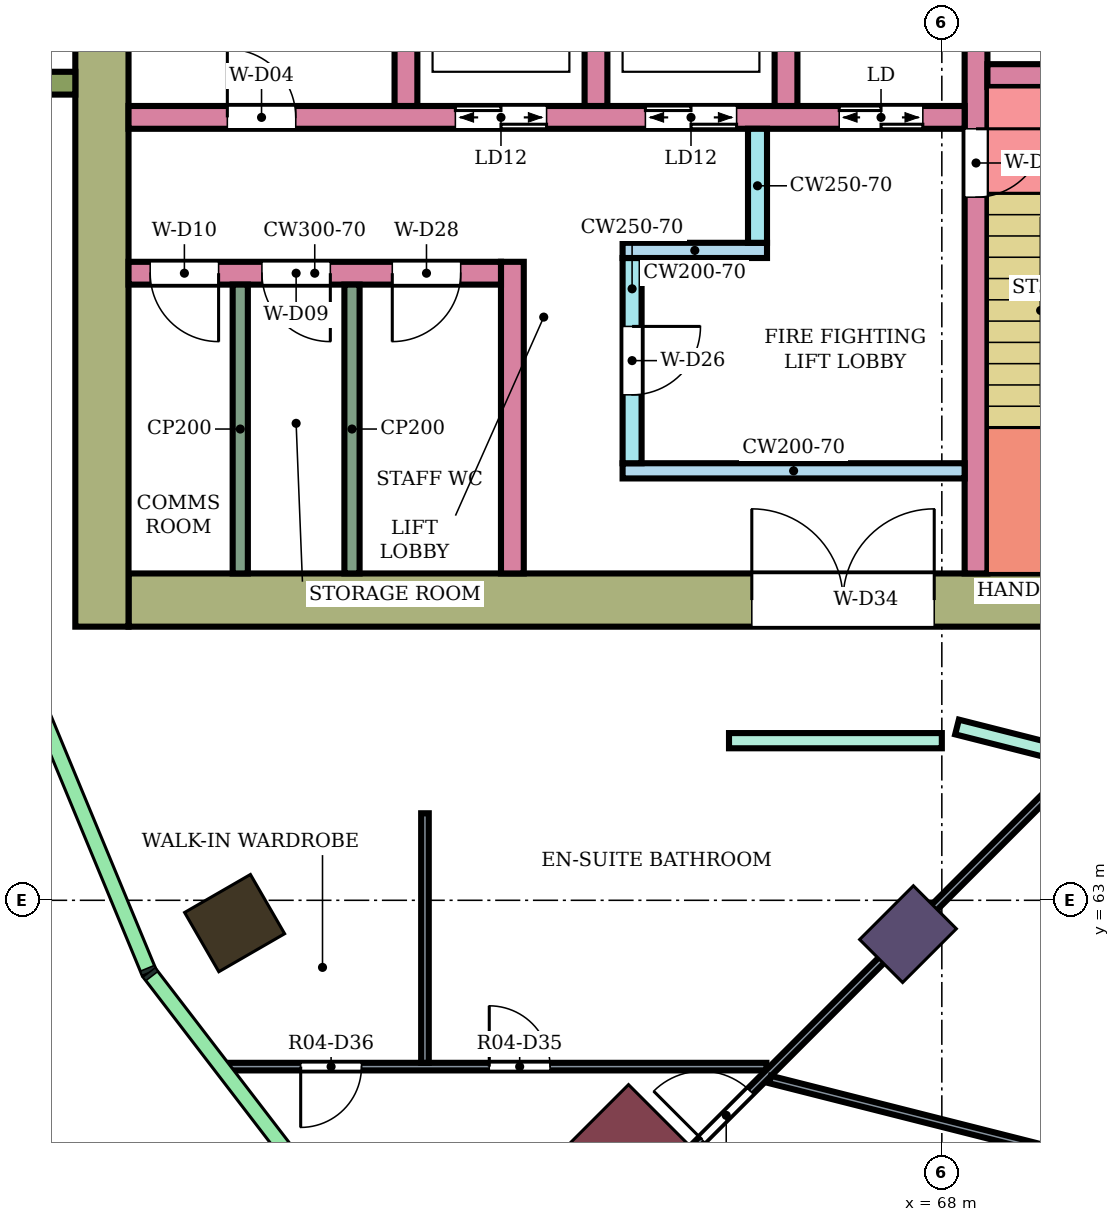
"""IFC4 building model, lengths in metres.
Left out: names, types, materials, properties, quantities, classifications, styles, units other than length and angle.
Written with IfcOpenShell. Run it as: python <this file> out.ifc"""

import sys

from ifc_helpers import new_model, si_unit, direction, frame, frame_2d, origin, origin_2d, place, context, subcontext, project, spatial, rectangle, extrude, element, fill, save


model = new_model("IFC4")
c1 = context("Model", 3, precision=1e-05, world=origin(), true_north=direction((0.0, 1.0)))
c2 = subcontext(c1, "Body", "Model", "MODEL_VIEW")
j1 = project(units=[si_unit("LENGTHUNIT", "METRE"), si_unit("PLANEANGLEUNIT", "RADIAN")], contexts=[c1])
p1 = place(None, origin())
s1 = spatial("IfcSite", under=j1, at=p1, CompositionType="ELEMENT")
p2 = place(p1, origin())
s2 = spatial("IfcBuilding", under=s1, at=p2, CompositionType="ELEMENT")
p3 = place(p2, frame((0.0, 0.0, 198.7)))
s3 = spatial("IfcBuildingStorey", under=s2, at=p3, CompositionType="ELEMENT", Elevation=198.7)
p4 = place(p3, frame((58.696, 62.7, 0.0), z_axis=(0.0, 0.0, 1.0), x_axis=(-0.866025403784, -0.5, 0.0)))
e1 = element("IfcColumn", 1, at=p4, inside=s3, PredefinedType="COLUMN", context=c2, shape_type="SweptSolid", body=[
    extrude(rectangle(XDim=1.0, YDim=0.9, at=origin_2d()), origin(), (0.0, 0.0, 1.0), 4.1),
])
p5 = place(p3, frame((67.555, 62.555, 0.0), z_axis=(0.0, 0.0, 1.0), x_axis=(-0.707106781187, -0.707106781187, 0.0)))
e2 = element("IfcColumn", 2, at=p5, inside=s3, PredefinedType="COLUMN", context=c2, shape_type="SweptSolid", body=[
    extrude(rectangle(XDim=1.0, YDim=0.8, at=origin_2d()), origin(), (0.0, 0.0, 1.0), 4.1),
])
p6 = place(p3, frame((64.09, 59.09, 0.0), z_axis=(0.0, 0.0, 1.0), x_axis=(-0.707106781187, -0.707106781187, 0.0)))
e3 = element("IfcColumn", 3, at=p6, inside=s3, PredefinedType="COLUMN", context=c2, shape_type="SweptSolid", body=[
    extrude(rectangle(XDim=1.8, YDim=2.4, at=origin_2d()), origin(), (0.0, 0.0, 1.0), 4.1),
])
p7 = place(p3, frame((72.1, 66.95, 0.0), z_axis=(0.0, 0.0, 1.0), x_axis=(-1.0, 0.0, 0.0)))
e4 = element("IfcWall", 4, at=p7, inside=s3, PredefinedType="SHEAR", context=c2, shape_type="SweptSolid", body=[
    extrude(rectangle(XDim=14.8, YDim=0.7, at=frame_2d((7.4, 0.0))), origin(), (0.0, 0.0, 1.0), 3.78),
])
p8 = place(p7, frame((4.2, 0.0, 0.0)))
e5 = element("IfcOpeningElement", 5, at=p8, cuts=e4, PredefinedType="OPENING", context=c2, shape_type="SweptSolid", body=[
    extrude(rectangle(XDim=2.4, YDim=2.4, at=frame_2d((1.2, 1.2))), frame((0.0, 0.36, 0.0), z_axis=(0.0, -1.0, 0.0), x_axis=(1.0, 0.0, 0.0)), (0.0, 0.0, 1.0), 0.72),
])
p9 = place(p3, frame((56.95, 83.4, 0.0), z_axis=(0.0, 0.0, 1.0), x_axis=(0.0, -1.0, 0.0)))
e6 = element("IfcWall", 6, at=p9, inside=s3, PredefinedType="SHEAR", context=c2, shape_type="SweptSolid", body=[
    extrude(rectangle(XDim=16.8, YDim=0.7, at=frame_2d((8.4, 0.0))), origin(), (0.0, 0.0, 1.0), 3.78),
])
p10 = place(p3, frame((68.45, 75.0, 0.0), z_axis=(0.0, 0.0, 1.0), x_axis=(0.0, -1.0, 0.0)))
e7 = element("IfcWall", 7, at=p10, inside=s3, PredefinedType="SHEAR", context=c2, shape_type="SweptSolid", body=[
    extrude(rectangle(XDim=7.7, YDim=0.3, at=frame_2d((3.85, 0.0))), origin(), (0.0, 0.0, 1.0), 3.78),
])
p11 = place(p10, frame((1.85, 0.0, 0.0)))
e8 = element("IfcOpeningElement", 8, at=p11, cuts=e7, PredefinedType="OPENING", context=c2, shape_type="SweptSolid", body=[
    extrude(rectangle(XDim=0.9, YDim=2.1, at=frame_2d((0.45, 1.05))), frame((0.0, 0.16, 0.0), z_axis=(0.0, -1.0, 0.0), x_axis=(1.0, 0.0, 0.0)), (0.0, 0.0, 1.0), 0.32),
])
p12 = place(p3, frame((71.65, 73.85, 0.0), z_axis=(0.0, 0.0, 1.0), x_axis=(-1.0, 0.0, 0.0)))
e9 = element("IfcWall", 9, at=p12, inside=s3, PredefinedType="SHEAR", context=c2, shape_type="SweptSolid", body=[
    extrude(rectangle(XDim=3.05, YDim=0.3, at=frame_2d((1.525, 0.0))), origin(), (0.0, 0.0, 1.0), 3.78),
])
p13 = place(p12, frame((1.1, 0.0, 0.0)))
e10 = element("IfcOpeningElement", 10, at=p13, cuts=e9, PredefinedType="OPENING", context=c2, shape_type="SweptSolid", body=[
    extrude(rectangle(XDim=0.7, YDim=2.0, at=frame_2d((0.35, 1.0))), frame((0.0, 0.16, 0.0), z_axis=(0.0, -1.0, 0.0), x_axis=(1.0, 0.0, 0.0)), (0.0, 0.0, 1.0), 0.32),
])
p14 = place(p3, frame((68.3, 73.3, 0.0), z_axis=(0.0, 0.0, 1.0), x_axis=(-1.0, 0.0, 0.0)))
e11 = element("IfcWall", 11, at=p14, inside=s3, PredefinedType="SHEAR", context=c2, shape_type="SweptSolid", body=[
    extrude(rectangle(XDim=11.0, YDim=0.3, at=frame_2d((5.5, 0.0))), origin(), (0.0, 0.0, 1.0), 3.78),
])
p15 = place(p14, frame((0.55, 0.0, 0.0)))
e12 = element("IfcOpeningElement", 12, at=p15, cuts=e11, PredefinedType="OPENING", context=c2, shape_type="SweptSolid", body=[
    extrude(rectangle(XDim=1.1, YDim=2.1, at=frame_2d((0.55, 1.05))), frame((0.0, 0.16, 0.0), z_axis=(0.0, -1.0, 0.0), x_axis=(1.0, 0.0, 0.0)), (0.0, 0.0, 1.0), 0.32),
])
p16 = place(p14, frame((3.0, 0.0, 0.0)))
e13 = element("IfcOpeningElement", 13, at=p16, cuts=e11, PredefinedType="OPENING", context=c2, shape_type="SweptSolid", body=[
    extrude(rectangle(XDim=1.2, YDim=2.1, at=frame_2d((0.6, 1.05))), frame((0.0, 0.16, 0.0), z_axis=(0.0, -1.0, 0.0), x_axis=(1.0, 0.0, 0.0)), (0.0, 0.0, 1.0), 0.32),
])
p17 = place(p14, frame((5.5, 0.0, 0.0)))
e14 = element("IfcOpeningElement", 14, at=p17, cuts=e11, PredefinedType="OPENING", context=c2, shape_type="SweptSolid", body=[
    extrude(rectangle(XDim=1.2, YDim=2.1, at=frame_2d((0.6, 1.05))), frame((0.0, 0.16, 0.0), z_axis=(0.0, -1.0, 0.0), x_axis=(1.0, 0.0, 0.0)), (0.0, 0.0, 1.0), 0.32),
])
p18 = place(p14, frame((8.8, 0.0, 0.0)))
e15 = element("IfcOpeningElement", 15, at=p18, cuts=e11, PredefinedType="OPENING", context=c2, shape_type="SweptSolid", body=[
    extrude(rectangle(XDim=0.9, YDim=2.1, at=frame_2d((0.45, 1.05))), frame((0.0, 0.16, 0.0), z_axis=(0.0, -1.0, 0.0), x_axis=(1.0, 0.0, 0.0)), (0.0, 0.0, 1.0), 0.32),
])
for number, where, z_axis, x_axis in (
    (16, (65.95, 76.0, 0.0), (0.0, 0.0, 1.0), (0.0, -1.0, 0.0)),
    (17, (63.45, 76.0, 0.0), (0.0, 0.0, 1.0), (0.0, -1.0, 0.0)),
    (18, (60.95, 76.0, 0.0), (0.0, 0.0, 1.0), (0.0, -1.0, 0.0)),
):
    element("IfcWall", number, at=place(p3, frame(where, z_axis=z_axis, x_axis=x_axis)), inside=s3, PredefinedType="SHEAR", context=c2, shape_type="SweptSolid", body=[
        extrude(rectangle(XDim=2.55, YDim=0.3, at=frame_2d((1.275, 0.0))), origin(), (0.0, 0.0, 1.0), 3.78),
    ])
p19 = place(p3, frame((68.3, 68.65, 0.0), z_axis=(0.0, 0.0, 1.0), x_axis=(-1.0, 0.0, 0.0)))
e19 = element("IfcWall", 19, at=p19, inside=s3, PredefinedType="SHEAR", context=c2, shape_type="SweptSolid", body=[
    extrude(rectangle(XDim=4.5, YDim=0.2, at=frame_2d((2.25, 0.0))), origin(), (0.0, 0.0, 1.0), 3.78),
])
p20 = place(p3, frame((63.925, 71.45, 0.0), z_axis=(0.0, 0.0, 1.0), x_axis=(0.0, -1.0, 0.0)))
e20 = element("IfcWall", 20, at=p20, inside=s3, PredefinedType="SHEAR", context=c2, shape_type="SweptSolid", body=[
    extrude(rectangle(XDim=2.7, YDim=0.25, at=frame_2d((1.35, 0.0))), origin(), (0.0, 0.0, 1.0), 3.78),
])
p21 = place(p20, frame((0.9, 0.0, 0.0)))
e21 = element("IfcOpeningElement", 21, at=p21, cuts=e20, PredefinedType="OPENING", context=c2, shape_type="SweptSolid", body=[
    extrude(rectangle(XDim=0.9, YDim=2.1, at=frame_2d((0.45, 1.05))), frame((0.0, 0.135, 0.0), z_axis=(0.0, -1.0, 0.0), x_axis=(1.0, 0.0, 0.0)), (0.0, 0.0, 1.0), 0.27),
])
p22 = place(p3, frame((65.7, 71.55, 0.0), z_axis=(0.0, 0.0, 1.0), x_axis=(-1.0, 0.0, 0.0)))
e22 = element("IfcWall", 22, at=p22, inside=s3, PredefinedType="SHEAR", context=c2, shape_type="SweptSolid", body=[
    extrude(rectangle(XDim=1.9, YDim=0.2, at=frame_2d((0.95, 0.0))), origin(), (0.0, 0.0, 1.0), 3.78),
])
p23 = place(p3, frame((65.575, 73.15, 0.0), z_axis=(0.0, 0.0, 1.0), x_axis=(0.0, -1.0, 0.0)))
e23 = element("IfcWall", 23, at=p23, inside=s3, PredefinedType="SHEAR", context=c2, shape_type="SweptSolid", body=[
    extrude(rectangle(XDim=1.5, YDim=0.25, at=frame_2d((0.75, 0.0))), origin(), (0.0, 0.0, 1.0), 3.78),
])
p24 = place(p3, frame((62.35, 71.4, 0.0), z_axis=(0.0, 0.0, 1.0), x_axis=(0.0, -1.0, 0.0)))
e24 = element("IfcWall", 24, at=p24, inside=s3, PredefinedType="SHEAR", context=c2, shape_type="SweptSolid", body=[
    extrude(rectangle(XDim=4.1, YDim=0.3, at=frame_2d((2.05, 0.0))), origin(), (0.0, 0.0, 1.0), 3.78),
])
p25 = place(p3, frame((62.2, 71.25, 0.0), z_axis=(0.0, 0.0, 1.0), x_axis=(-1.0, 0.0, 0.0)))
e25 = element("IfcWall", 25, at=p25, inside=s3, PredefinedType="SHEAR", context=c2, shape_type="SweptSolid", body=[
    extrude(rectangle(XDim=4.9, YDim=0.3, at=frame_2d((2.45, 0.0))), origin(), (0.0, 0.0, 1.0), 3.78),
])
p26 = place(p25, frame((0.53, 0.0, 0.0)))
e26 = element("IfcOpeningElement", 26, at=p26, cuts=e25, PredefinedType="OPENING", context=c2, shape_type="SweptSolid", body=[
    extrude(rectangle(XDim=0.9, YDim=2.1, at=frame_2d((0.45, 1.05))), frame((0.0, 0.16, 0.0), z_axis=(0.0, -1.0, 0.0), x_axis=(1.0, 0.0, 0.0)), (0.0, 0.0, 1.0), 0.32),
])
p27 = place(p25, frame((2.245, 0.0, 0.0)))
e27 = element("IfcOpeningElement", 27, at=p27, cuts=e25, PredefinedType="OPENING", context=c2, shape_type="SweptSolid", body=[
    extrude(rectangle(XDim=0.9, YDim=2.1, at=frame_2d((0.45, 1.05))), frame((0.0, 0.16, 0.0), z_axis=(0.0, -1.0, 0.0), x_axis=(1.0, 0.0, 0.0)), (0.0, 0.0, 1.0), 0.32),
])
p28 = place(p25, frame((3.715, 0.0, 0.0)))
e28 = element("IfcOpeningElement", 28, at=p28, cuts=e25, PredefinedType="OPENING", context=c2, shape_type="SweptSolid", body=[
    extrude(rectangle(XDim=0.9, YDim=2.1, at=frame_2d((0.45, 1.05))), frame((0.0, 0.16, 0.0), z_axis=(0.0, -1.0, 0.0), x_axis=(1.0, 0.0, 0.0)), (0.0, 0.0, 1.0), 0.32),
])
p29 = place(p3, frame((56.6, 73.75, 0.0), z_axis=(0.0, 0.0, 1.0), x_axis=(-1.0, 0.0, 0.0)))
e29 = element("IfcWall", 29, at=p29, inside=s3, PredefinedType="NOTDEFINED", context=c2, shape_type="SweptSolid", body=[
    extrude(rectangle(XDim=2.416, YDim=0.3, at=frame_2d((1.208, 0.0))), origin(), (0.0, 0.0, 1.0), 4.1),
])
p30 = place(p3, frame((65.2, 65.1, 0.0), z_axis=(0.0, 0.0, 1.0), x_axis=(1.0, 0.0, 0.0)))
e30 = element("IfcWall", 30, at=p30, inside=s3, PredefinedType="PARTITIONING", context=c2, shape_type="SweptSolid", body=[
    extrude(rectangle(XDim=2.8, YDim=0.2, at=frame_2d((1.4, 0.0))), origin(), (0.0, 0.0, 1.0), 3.65),
])
p31 = place(p3, frame((68.2, 65.28, 0.0), z_axis=(0.0, 0.0, 1.0), x_axis=(0.969450596516, -0.245286650503, 0.0)))
e31 = element("IfcWall", 31, at=p31, inside=s3, PredefinedType="PARTITIONING", context=c2, shape_type="SweptSolid", body=[
    extrude(rectangle(XDim=5.928, YDim=0.2, at=frame_2d((2.964, 0.0))), origin(), (0.0, 0.0, 1.0), 3.65),
])
p32 = place(p3, frame((58.6, 60.812, 0.0), z_axis=(0.0, 0.0, 1.0), x_axis=(1.0, 0.0, 0.0)))
e32 = element("IfcWall", 32, at=p32, inside=s3, PredefinedType="PARTITIONING", context=c2, shape_type="SweptSolid", body=[
    extrude(rectangle(XDim=7.092, YDim=0.1, at=frame_2d((3.546, 0.0))), origin(), (0.0, 0.0, 1.0), 3.65),
])
p33 = place(p32, frame((3.446, 0.0, 0.0)))
e33 = element("IfcOpeningElement", 33, at=p33, cuts=e32, PredefinedType="OPENING", context=c2, shape_type="SweptSolid", body=[
    extrude(rectangle(XDim=0.8, YDim=2.1, at=frame_2d((0.4, 1.05))), frame((0.0, 0.06, 0.0), z_axis=(0.0, -1.0, 0.0), x_axis=(1.0, 0.0, 0.0)), (0.0, 0.0, 1.0), 0.12),
])
p34 = place(p32, frame((0.965, 0.0, 0.0)))
e34 = element("IfcOpeningElement", 34, at=p34, cuts=e32, PredefinedType="OPENING", context=c2, shape_type="SweptSolid", body=[
    extrude(rectangle(XDim=0.8, YDim=2.1, at=frame_2d((0.4, 1.05))), frame((0.0, 0.06, 0.0), z_axis=(0.0, -1.0, 0.0), x_axis=(1.0, 0.0, 0.0)), (0.0, 0.0, 1.0), 0.12),
])
p35 = place(p3, frame((61.2, 60.862, 0.0), z_axis=(0.0, 0.0, 1.0), x_axis=(0.0, 1.0, 0.0)))
e35 = element("IfcWall", 35, at=p35, inside=s3, PredefinedType="PARTITIONING", context=c2, shape_type="SweptSolid", body=[
    extrude(rectangle(XDim=3.283, YDim=0.1, at=frame_2d((1.642, 0.0))), origin(), (0.0, 0.0, 1.0), 3.65),
])
p36 = place(p3, frame((63.592, 58.6, 0.0), z_axis=(0.0, 0.0, 1.0), x_axis=(0.707260766325, 0.706952762508, 0.0)))
e36 = element("IfcWall", 36, at=p36, inside=s3, PredefinedType="PARTITIONING", context=c2, shape_type="SweptSolid", body=[
    extrude(rectangle(XDim=8.719, YDim=0.1, at=frame_2d((4.36, 0.0))), origin(), (0.0, 0.0, 1.0), 3.65),
])
p37 = place(p36, frame((1.772, 0.0, 0.0)))
e37 = element("IfcOpeningElement", 37, at=p37, cuts=e36, PredefinedType="OPENING", context=c2, shape_type="SweptSolid", body=[
    extrude(rectangle(XDim=0.9, YDim=2.1, at=frame_2d((0.45, 1.05))), frame((0.0, 0.06, 0.0), z_axis=(0.0, -1.0, 0.0), x_axis=(1.0, 0.0, 0.0)), (0.0, 0.0, 1.0), 0.12),
])
p38 = place(p3, frame((65.74, 60.642, 0.0), z_axis=(0.0, 0.0, 1.0), x_axis=(0.969435742918, -0.245345349156, 0.0)))
e38 = element("IfcWall", 38, at=p38, inside=s3, PredefinedType="PARTITIONING", context=c2, shape_type="SweptSolid", body=[
    extrude(rectangle(XDim=5.314, YDim=0.1, at=frame_2d((2.657, 0.0))), origin(), (0.0, 0.0, 1.0), 3.65),
])
p39 = place(p3, frame((67.101, 52.659, 0.0), z_axis=(0.0, 0.0, 1.0), x_axis=(0.500035926033, 0.866004660886, 0.0)))
e39 = element("IfcWall", 39, at=p39, inside=s3, PredefinedType="PARTITIONING", context=c2, shape_type="SweptSolid", body=[
    extrude(rectangle(XDim=12.876, YDim=0.1, at=frame_2d((6.438, 0.0))), origin(), (0.0, 0.0, 1.0), 3.65),
])
p40 = place(p39, frame((2.401, 0.0, 0.0)))
e40 = element("IfcOpeningElement", 40, at=p40, cuts=e39, PredefinedType="OPENING", context=c2, shape_type="SweptSolid", body=[
    extrude(rectangle(XDim=0.9, YDim=2.1, at=frame_2d((0.45, 1.05))), frame((0.0, 0.06, 0.0), z_axis=(0.0, -1.0, 0.0), x_axis=(1.0, 0.0, 0.0)), (0.0, 0.0, 1.0), 0.12),
])
p41 = place(p39, frame((9.936, 0.0, 0.0)))
e41 = element("IfcOpeningElement", 41, at=p41, cuts=e39, PredefinedType="OPENING", context=c2, shape_type="SweptSolid", body=[
    extrude(rectangle(XDim=0.8, YDim=2.1, at=frame_2d((0.4, 1.05))), frame((0.0, 0.06, 0.0), z_axis=(0.0, -1.0, 0.0), x_axis=(1.0, 0.0, 0.0)), (0.0, 0.0, 1.0), 0.12),
])
for number, where, z_axis, x_axis in (
    (42, (60.24, 71.1, 0.0), (0.0, 0.0, 1.0), (0.0, -1.0, 0.0)),
    (43, (58.77, 71.1, 0.0), (0.0, 0.0, 1.0), (0.0, -1.0, 0.0)),
):
    element("IfcWall", number, at=place(p3, frame(where, z_axis=z_axis, x_axis=x_axis)), inside=s3, PredefinedType="PARTITIONING", context=c2, shape_type="SweptSolid", body=[
        extrude(rectangle(XDim=3.8, YDim=0.2, at=frame_2d((1.9, 0.0))), origin(), (0.0, 0.0, 1.0), 3.78),
    ])
p42 = place(p37, origin())
e44 = element("IfcDoor", 44, at=p42, inside=s3, OperationType="SINGLE_SWING_LEFT", PredefinedType="DOOR", context=c2, shape_type="SweptSolid", body=[
    extrude(rectangle(XDim=0.9, YDim=2.1, at=frame_2d((0.45, 1.05))), frame((0.0, 0.025, 0.0), z_axis=(0.0, -1.0, 0.0), x_axis=(1.0, 0.0, 0.0)), (0.0, 0.0, 1.0), 0.05),
])
fill(e37, e44)
p43 = place(p33, origin())
e45 = element("IfcDoor", 45, at=p43, inside=s3, OperationType="SINGLE_SWING_LEFT", PredefinedType="DOOR", context=c2, shape_type="SweptSolid", body=[
    extrude(rectangle(XDim=0.8, YDim=2.1, at=frame_2d((0.4, 1.05))), frame((0.0, 0.025, 0.0), z_axis=(0.0, -1.0, 0.0), x_axis=(1.0, 0.0, 0.0)), (0.0, 0.0, 1.0), 0.05),
])
fill(e33, e45)
p44 = place(p34, frame((0.8, 0.0, 0.0), z_axis=(0.0, 0.0, 1.0), x_axis=(-1.0, 0.0, 0.0)))
e46 = element("IfcDoor", 46, at=p44, inside=s3, OperationType="SINGLE_SWING_RIGHT", PredefinedType="DOOR", context=c2, shape_type="SweptSolid", body=[
    extrude(rectangle(XDim=0.8, YDim=2.1, at=frame_2d((0.4, 1.05))), frame((0.0, 0.025, 0.0), z_axis=(0.0, -1.0, 0.0), x_axis=(1.0, 0.0, 0.0)), (0.0, 0.0, 1.0), 0.05),
])
fill(e34, e46)
p45 = place(p11, origin())
e47 = element("IfcDoor", 47, at=p45, inside=s3, OperationType="SINGLE_SWING_LEFT", PredefinedType="DOOR", context=c2, shape_type="SweptSolid", body=[
    extrude(rectangle(XDim=0.9, YDim=2.1, at=frame_2d((0.45, 1.05))), frame((0.0, 0.025, 0.0), z_axis=(0.0, -1.0, 0.0), x_axis=(1.0, 0.0, 0.0)), (0.0, 0.0, 1.0), 0.05),
])
fill(e8, e47)
p46 = place(p15, origin())
e48 = element("IfcDoor", 48, at=p46, inside=s3, OperationType="DOUBLE_DOOR_SLIDING", PredefinedType="DOOR", context=c2, shape_type="SweptSolid", body=[
    extrude(rectangle(XDim=1.1, YDim=2.1, at=frame_2d((0.55, 1.05))), frame((0.0, 0.025, 0.0), z_axis=(0.0, -1.0, 0.0), x_axis=(1.0, 0.0, 0.0)), (0.0, 0.0, 1.0), 0.05),
])
fill(e12, e48)
p47 = place(p16, origin())
e49 = element("IfcDoor", 49, at=p47, inside=s3, OperationType="DOUBLE_DOOR_SLIDING", PredefinedType="DOOR", context=c2, shape_type="SweptSolid", body=[
    extrude(rectangle(XDim=1.2, YDim=2.1, at=frame_2d((0.6, 1.05))), frame((0.0, 0.025, 0.0), z_axis=(0.0, -1.0, 0.0), x_axis=(1.0, 0.0, 0.0)), (0.0, 0.0, 1.0), 0.05),
])
fill(e13, e49)
p48 = place(p17, origin())
e50 = element("IfcDoor", 50, at=p48, inside=s3, OperationType="DOUBLE_DOOR_SLIDING", PredefinedType="DOOR", context=c2, shape_type="SweptSolid", body=[
    extrude(rectangle(XDim=1.2, YDim=2.1, at=frame_2d((0.6, 1.05))), frame((0.0, 0.025, 0.0), z_axis=(0.0, -1.0, 0.0), x_axis=(1.0, 0.0, 0.0)), (0.0, 0.0, 1.0), 0.05),
])
fill(e14, e50)
p49 = place(p18, frame((0.9, 0.0, 0.0), z_axis=(0.0, 0.0, 1.0), x_axis=(-1.0, 0.0, 0.0)))
e51 = element("IfcDoor", 51, at=p49, inside=s3, OperationType="SINGLE_SWING_LEFT", PredefinedType="DOOR", context=c2, shape_type="SweptSolid", body=[
    extrude(rectangle(XDim=0.9, YDim=2.1, at=frame_2d((0.45, 1.05))), frame((0.0, 0.025, 0.0), z_axis=(0.0, -1.0, 0.0), x_axis=(1.0, 0.0, 0.0)), (0.0, 0.0, 1.0), 0.05),
])
fill(e15, e51)
p50 = place(p21, origin())
e52 = element("IfcDoor", 52, at=p50, inside=s3, OperationType="SINGLE_SWING_LEFT", PredefinedType="DOOR", context=c2, shape_type="SweptSolid", body=[
    extrude(rectangle(XDim=0.9, YDim=2.1, at=frame_2d((0.45, 1.05))), frame((0.0, 0.025, 0.0), z_axis=(0.0, -1.0, 0.0), x_axis=(1.0, 0.0, 0.0)), (0.0, 0.0, 1.0), 0.05),
])
fill(e21, e52)
p51 = place(p26, origin())
e53 = element("IfcDoor", 53, at=p51, inside=s3, OperationType="SINGLE_SWING_RIGHT", PredefinedType="DOOR", context=c2, shape_type="SweptSolid", body=[
    extrude(rectangle(XDim=0.9, YDim=2.1, at=frame_2d((0.45, 1.05))), frame((0.0, 0.025, 0.0), z_axis=(0.0, -1.0, 0.0), x_axis=(1.0, 0.0, 0.0)), (0.0, 0.0, 1.0), 0.05),
])
fill(e26, e53)
p52 = place(p27, origin())
e54 = element("IfcDoor", 54, at=p52, inside=s3, OperationType="SINGLE_SWING_LEFT", PredefinedType="DOOR", context=c2, shape_type="SweptSolid", body=[
    extrude(rectangle(XDim=0.9, YDim=2.1, at=frame_2d((0.45, 1.05))), frame((0.0, 0.025, 0.0), z_axis=(0.0, -1.0, 0.0), x_axis=(1.0, 0.0, 0.0)), (0.0, 0.0, 1.0), 0.05),
])
fill(e27, e54)
p53 = place(p28, origin())
e55 = element("IfcDoor", 55, at=p53, inside=s3, OperationType="SINGLE_SWING_LEFT", PredefinedType="DOOR", context=c2, shape_type="SweptSolid", body=[
    extrude(rectangle(XDim=0.9, YDim=2.1, at=frame_2d((0.45, 1.05))), frame((0.0, 0.025, 0.0), z_axis=(0.0, -1.0, 0.0), x_axis=(1.0, 0.0, 0.0)), (0.0, 0.0, 1.0), 0.05),
])
fill(e28, e55)
p54 = place(p8, frame((2.4, 0.0, 0.0), z_axis=(0.0, 0.0, 1.0), x_axis=(-1.0, 0.0, 0.0)))
e56 = element("IfcDoor", 56, at=p54, inside=s3, OperationType="DOUBLE_DOOR_SINGLE_SWING", PredefinedType="DOOR", context=c2, shape_type="SweptSolid", body=[
    extrude(rectangle(XDim=2.4, YDim=2.4, at=frame_2d((1.2, 1.2))), frame((0.0, 0.025, 0.0), z_axis=(0.0, -1.0, 0.0), x_axis=(1.0, 0.0, 0.0)), (0.0, 0.0, 1.0), 0.05),
])
fill(e5, e56)
save(model, sys.argv[1])
